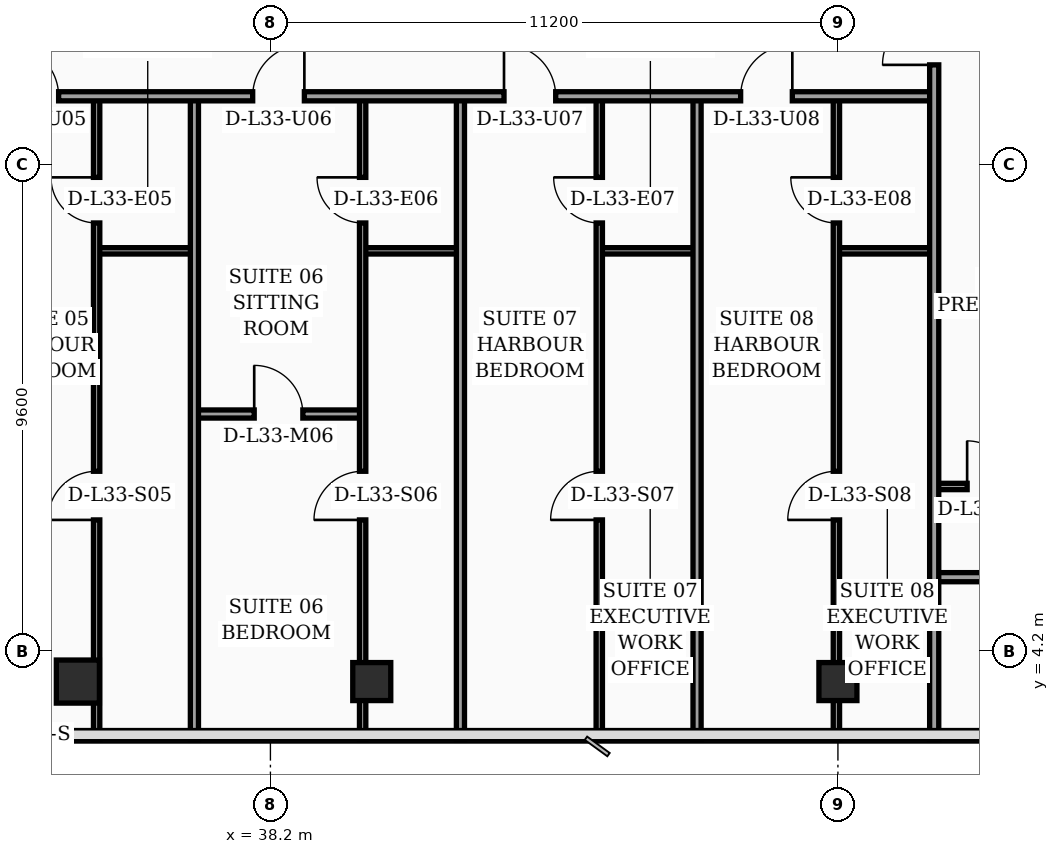
"""IFC4 building model, lengths in metres.
Left out: names, types, materials, properties, quantities, classifications, styles, units other than length and angle.
Written with IfcOpenShell. Run it as: python <this file> out.ifc"""

import sys

from ifc_helpers import new_model, si_unit, direction, frame, frame_2d, origin, origin_2d, place, context, subcontext, project, spatial, rectangle, hollow_rectangle, extrude, element, fill, save


model = new_model("IFC4")
c1 = context("Model", 3, precision=1e-05, world=origin(), true_north=direction((0.0, 1.0)))
c2 = subcontext(c1, "Body", "Model", "MODEL_VIEW")
j1 = project(units=[si_unit("LENGTHUNIT", "METRE"), si_unit("PLANEANGLEUNIT", "RADIAN")], contexts=[c1])
p1 = place(None, origin())
s1 = spatial("IfcSite", under=j1, at=p1, CompositionType="ELEMENT")
p2 = place(p1, origin())
s2 = spatial("IfcBuilding", under=s1, at=p2, CompositionType="ELEMENT")
p3 = place(p2, frame((0.0, 0.0, 135.4)))
s3 = spatial("IfcBuildingStorey", under=s2, at=p3, CompositionType="ELEMENT", Elevation=135.4)
p4 = place(p3, frame((34.4, 3.6, 0.0), z_axis=(0.0, 0.0, 1.0), x_axis=(1.0, 0.0, 0.0)))
e1 = element("IfcColumn", 1, at=p4, inside=s3, PredefinedType="COLUMN", context=c2, shape_type="SweptSolid", body=[
    extrude(hollow_rectangle(XDim=0.85, YDim=0.85, WallThickness=0.036, at=origin_2d()), origin(), (0.0, 0.0, 1.0), 3.52),
])
for number, where, z_axis, x_axis in (
    (2, (40.2, 3.6, 0.0), (0.0, 0.0, 1.0), (1.0, 0.0, 0.0)),
    (3, (49.4, 3.6, 0.0), (0.0, 0.0, 1.0), (1.0, 0.0, 0.0)),
):
    element("IfcColumn", number, at=place(p3, frame(where, z_axis=z_axis, x_axis=x_axis)), inside=s3, PredefinedType="COLUMN", context=c2, shape_type="SweptSolid", body=[
        extrude(hollow_rectangle(XDim=0.75, YDim=0.75, WallThickness=0.032, at=origin_2d()), origin(), (0.0, 0.0, 1.0), 3.52),
    ])
p5 = place(p3, frame((59.23, 5.505, 0.0), z_axis=(0.0, 0.0, 1.0), x_axis=(-0.300509063924, 0.953778958931, 0.0)))
e4 = element("IfcWall", 4, at=p5, inside=s3, PredefinedType="SOLIDWALL", context=c2, shape_type="SweptSolid", body=[
    extrude(rectangle(XDim=30.814, YDim=0.32, at=frame_2d((15.407, 0.0))), origin(), (0.0, 0.0, 1.0), 3.52),
])
p6 = place(p5, frame((18.796, 0.0, 0.0)))
e5 = element("IfcOpeningElement", 5, at=p6, cuts=e4, PredefinedType="OPENING", context=c2, shape_type="SweptSolid", body=[
    extrude(rectangle(XDim=1.4, YDim=2.25, at=frame_2d((0.7, 1.125))), frame((0.0, 0.17, 0.0), z_axis=(0.0, -1.0, 0.0), x_axis=(1.0, 0.0, 0.0)), (0.0, 0.0, 1.0), 0.34),
])
p7 = place(p5, frame((2.65, 0.0, 0.75)))
e6 = element("IfcOpeningElement", 6, at=p7, cuts=e4, PredefinedType="OPENING", context=c2, shape_type="SweptSolid", body=[
    extrude(rectangle(XDim=1.5, YDim=1.6, at=frame_2d((0.75, 0.8))), frame((0.0, 0.17, 0.0), z_axis=(0.0, -1.0, 0.0), x_axis=(1.0, 0.0, 0.0)), (0.0, 0.0, 1.0), 0.34),
])
p8 = place(p5, frame((4.7, 0.0, 0.75)))
e7 = element("IfcOpeningElement", 7, at=p8, cuts=e4, PredefinedType="OPENING", context=c2, shape_type="SweptSolid", body=[
    extrude(rectangle(XDim=1.5, YDim=1.6, at=frame_2d((0.75, 0.8))), frame((0.0, 0.17, 0.0), z_axis=(0.0, -1.0, 0.0), x_axis=(1.0, 0.0, 0.0)), (0.0, 0.0, 1.0), 0.34),
])
p9 = place(p5, frame((7.8, 0.0, 0.75)))
e8 = element("IfcOpeningElement", 8, at=p9, cuts=e4, PredefinedType="OPENING", context=c2, shape_type="SweptSolid", body=[
    extrude(rectangle(XDim=1.5, YDim=1.6, at=frame_2d((0.75, 0.8))), frame((0.0, 0.17, 0.0), z_axis=(0.0, -1.0, 0.0), x_axis=(1.0, 0.0, 0.0)), (0.0, 0.0, 1.0), 0.34),
])
p10 = place(p5, frame((10.9, 0.0, 0.75)))
e9 = element("IfcOpeningElement", 9, at=p10, cuts=e4, PredefinedType="OPENING", context=c2, shape_type="SweptSolid", body=[
    extrude(rectangle(XDim=1.5, YDim=1.6, at=frame_2d((0.75, 0.8))), frame((0.0, 0.17, 0.0), z_axis=(0.0, -1.0, 0.0), x_axis=(1.0, 0.0, 0.0)), (0.0, 0.0, 1.0), 0.34),
])
p11 = place(p5, frame((14.0, 0.0, 0.75)))
e10 = element("IfcOpeningElement", 10, at=p11, cuts=e4, PredefinedType="OPENING", context=c2, shape_type="SweptSolid", body=[
    extrude(rectangle(XDim=1.5, YDim=1.6, at=frame_2d((0.75, 0.8))), frame((0.0, 0.17, 0.0), z_axis=(0.0, -1.0, 0.0), x_axis=(1.0, 0.0, 0.0)), (0.0, 0.0, 1.0), 0.34),
])
p12 = place(p5, frame((16.55, 0.0, 0.75)))
e11 = element("IfcOpeningElement", 11, at=p12, cuts=e4, PredefinedType="OPENING", context=c2, shape_type="SweptSolid", body=[
    extrude(rectangle(XDim=1.5, YDim=1.6, at=frame_2d((0.75, 0.8))), frame((0.0, 0.17, 0.0), z_axis=(0.0, -1.0, 0.0), x_axis=(1.0, 0.0, 0.0)), (0.0, 0.0, 1.0), 0.34),
])
p13 = place(p5, frame((20.75, 0.0, 0.75)))
e12 = element("IfcOpeningElement", 12, at=p13, cuts=e4, PredefinedType="OPENING", context=c2, shape_type="SweptSolid", body=[
    extrude(rectangle(XDim=1.5, YDim=1.6, at=frame_2d((0.75, 0.8))), frame((0.0, 0.17, 0.0), z_axis=(0.0, -1.0, 0.0), x_axis=(1.0, 0.0, 0.0)), (0.0, 0.0, 1.0), 0.34),
])
p14 = place(p5, frame((23.3, 0.0, 0.75)))
e13 = element("IfcOpeningElement", 13, at=p14, cuts=e4, PredefinedType="OPENING", context=c2, shape_type="SweptSolid", body=[
    extrude(rectangle(XDim=1.5, YDim=1.6, at=frame_2d((0.75, 0.8))), frame((0.0, 0.17, 0.0), z_axis=(0.0, -1.0, 0.0), x_axis=(1.0, 0.0, 0.0)), (0.0, 0.0, 1.0), 0.34),
])
p15 = place(p5, frame((26.4, 0.0, 0.75)))
e14 = element("IfcOpeningElement", 14, at=p15, cuts=e4, PredefinedType="OPENING", context=c2, shape_type="SweptSolid", body=[
    extrude(rectangle(XDim=1.5, YDim=1.6, at=frame_2d((0.75, 0.8))), frame((0.0, 0.17, 0.0), z_axis=(0.0, -1.0, 0.0), x_axis=(1.0, 0.0, 0.0)), (0.0, 0.0, 1.0), 0.34),
])
p16 = place(p3, frame((34.77, 12.1, 0.0), z_axis=(0.0, 0.0, 1.0), x_axis=(1.0, 0.0, 0.0)))
e15 = element("IfcWall", 15, at=p16, inside=s3, PredefinedType="PARTITIONING", context=c2, shape_type="SweptSolid", body=[
    extrude(rectangle(XDim=1.93, YDim=0.125, at=frame_2d((0.965, 0.0))), origin(), (0.0, 0.0, 1.0), 2.82),
])
p17 = place(p3, frame((34.77, 2.44, 0.0), z_axis=(0.0, 0.0, 1.0), x_axis=(0.0, 1.0, 0.0)))
e16 = element("IfcWall", 16, at=p17, inside=s3, PredefinedType="PARTITIONING", context=c2, shape_type="SweptSolid", body=[
    extrude(rectangle(XDim=12.71, YDim=0.125, at=frame_2d((6.355, 0.0))), origin(), (0.0, 0.0, 1.0), 2.82),
])
p18 = place(p17, frame((4.35, 0.0, 0.0)))
e17 = element("IfcOpeningElement", 17, at=p18, cuts=e16, PredefinedType="OPENING", context=c2, shape_type="SweptSolid", body=[
    extrude(rectangle(XDim=0.96, YDim=2.2, at=frame_2d((0.48, 1.1))), frame((0.0, 0.073, 0.0), z_axis=(0.0, -1.0, 0.0), x_axis=(1.0, 0.0, 0.0)), (0.0, 0.0, 1.0), 0.145),
])
p19 = place(p17, frame((10.21, 0.0, 0.0)))
e18 = element("IfcOpeningElement", 18, at=p19, cuts=e16, PredefinedType="OPENING", context=c2, shape_type="SweptSolid", body=[
    extrude(rectangle(XDim=0.9, YDim=2.15, at=frame_2d((0.45, 1.075))), frame((0.0, 0.073, 0.0), z_axis=(0.0, -1.0, 0.0), x_axis=(1.0, 0.0, 0.0)), (0.0, 0.0, 1.0), 0.145),
])
p20 = place(p3, frame((40.02, 12.1, 0.0), z_axis=(0.0, 0.0, 1.0), x_axis=(1.0, 0.0, 0.0)))
e19 = element("IfcWall", 19, at=p20, inside=s3, PredefinedType="PARTITIONING", context=c2, shape_type="SweptSolid", body=[
    extrude(rectangle(XDim=1.93, YDim=0.125, at=frame_2d((0.965, 0.0))), origin(), (0.0, 0.0, 1.0), 3.52),
])
p21 = place(p3, frame((36.7, 8.88, 0.0), z_axis=(0.0, 0.0, 1.0), x_axis=(1.0, 0.0, 0.0)))
e20 = element("IfcWall", 20, at=p21, inside=s3, PredefinedType="PARTITIONING", context=c2, shape_type="SweptSolid", body=[
    extrude(rectangle(XDim=3.32, YDim=0.16, at=frame_2d((1.66, 0.0))), origin(), (0.0, 0.0, 1.0), 2.82),
])
p22 = place(p21, frame((1.18, 0.0, 0.0)))
e21 = element("IfcOpeningElement", 21, at=p22, cuts=e20, PredefinedType="OPENING", context=c2, shape_type="SweptSolid", body=[
    extrude(rectangle(XDim=0.96, YDim=2.2, at=frame_2d((0.48, 1.1))), frame((0.0, 0.09, 0.0), z_axis=(0.0, -1.0, 0.0), x_axis=(1.0, 0.0, 0.0)), (0.0, 0.0, 1.0), 0.18),
])
p23 = place(p3, frame((40.02, 2.44, 0.0), z_axis=(0.0, 0.0, 1.0), x_axis=(0.0, 1.0, 0.0)))
e22 = element("IfcWall", 22, at=p23, inside=s3, PredefinedType="PARTITIONING", context=c2, shape_type="SweptSolid", body=[
    extrude(rectangle(XDim=12.71, YDim=0.125, at=frame_2d((6.355, 0.0))), origin(), (0.0, 0.0, 1.0), 2.82),
])
p24 = place(p23, frame((4.35, 0.0, 0.0)))
e23 = element("IfcOpeningElement", 23, at=p24, cuts=e22, PredefinedType="OPENING", context=c2, shape_type="SweptSolid", body=[
    extrude(rectangle(XDim=0.96, YDim=2.2, at=frame_2d((0.48, 1.1))), frame((0.0, 0.073, 0.0), z_axis=(0.0, -1.0, 0.0), x_axis=(1.0, 0.0, 0.0)), (0.0, 0.0, 1.0), 0.145),
])
p25 = place(p23, frame((10.21, 0.0, 0.0)))
e24 = element("IfcOpeningElement", 24, at=p25, cuts=e22, PredefinedType="OPENING", context=c2, shape_type="SweptSolid", body=[
    extrude(rectangle(XDim=0.9, YDim=2.15, at=frame_2d((0.45, 1.075))), frame((0.0, 0.073, 0.0), z_axis=(0.0, -1.0, 0.0), x_axis=(1.0, 0.0, 0.0)), (0.0, 0.0, 1.0), 0.145),
])
p26 = place(p3, frame((36.7, 2.44, 0.0), z_axis=(0.0, 0.0, 1.0), x_axis=(0.0, 1.0, 0.0)))
e25 = element("IfcWall", 25, at=p26, inside=s3, PredefinedType="PARTITIONING", context=c2, shape_type="SweptSolid", body=[
    extrude(rectangle(XDim=12.71, YDim=0.16, at=frame_2d((6.355, 0.0))), origin(), (0.0, 0.0, 1.0), 2.82),
])
p27 = place(p3, frame((44.69, 12.1, 0.0), z_axis=(0.0, 0.0, 1.0), x_axis=(1.0, 0.0, 0.0)))
e26 = element("IfcWall", 26, at=p27, inside=s3, PredefinedType="PARTITIONING", context=c2, shape_type="SweptSolid", body=[
    extrude(rectangle(XDim=1.93, YDim=0.125, at=frame_2d((0.965, 0.0))), origin(), (0.0, 0.0, 1.0), 3.52),
])
p28 = place(p3, frame((44.69, 2.44, 0.0), z_axis=(0.0, 0.0, 1.0), x_axis=(0.0, 1.0, 0.0)))
e27 = element("IfcWall", 27, at=p28, inside=s3, PredefinedType="PARTITIONING", context=c2, shape_type="SweptSolid", body=[
    extrude(rectangle(XDim=12.71, YDim=0.125, at=frame_2d((6.355, 0.0))), origin(), (0.0, 0.0, 1.0), 3.02),
])
p29 = place(p28, frame((4.35, 0.0, 0.0)))
e28 = element("IfcOpeningElement", 28, at=p29, cuts=e27, PredefinedType="OPENING", context=c2, shape_type="SweptSolid", body=[
    extrude(rectangle(XDim=0.96, YDim=2.2, at=frame_2d((0.48, 1.1))), frame((0.0, 0.073, 0.0), z_axis=(0.0, -1.0, 0.0), x_axis=(1.0, 0.0, 0.0)), (0.0, 0.0, 1.0), 0.145),
])
p30 = place(p28, frame((10.21, 0.0, 0.0)))
e29 = element("IfcOpeningElement", 29, at=p30, cuts=e27, PredefinedType="OPENING", context=c2, shape_type="SweptSolid", body=[
    extrude(rectangle(XDim=0.9, YDim=2.15, at=frame_2d((0.45, 1.075))), frame((0.0, 0.073, 0.0), z_axis=(0.0, -1.0, 0.0), x_axis=(1.0, 0.0, 0.0)), (0.0, 0.0, 1.0), 0.145),
])
p31 = place(p3, frame((41.95, 2.44, 0.0), z_axis=(0.0, 0.0, 1.0), x_axis=(0.0, 1.0, 0.0)))
e30 = element("IfcWall", 30, at=p31, inside=s3, PredefinedType="PARTITIONING", context=c2, shape_type="SweptSolid", body=[
    extrude(rectangle(XDim=12.71, YDim=0.16, at=frame_2d((6.355, 0.0))), origin(), (0.0, 0.0, 1.0), 3.02),
])
p32 = place(p3, frame((49.37, 12.1, 0.0), z_axis=(0.0, 0.0, 1.0), x_axis=(1.0, 0.0, 0.0)))
e31 = element("IfcWall", 31, at=p32, inside=s3, PredefinedType="PARTITIONING", context=c2, shape_type="SweptSolid", body=[
    extrude(rectangle(XDim=1.93, YDim=0.125, at=frame_2d((0.965, 0.0))), origin(), (0.0, 0.0, 1.0), 3.52),
])
p33 = place(p3, frame((49.37, 2.44, 0.0), z_axis=(0.0, 0.0, 1.0), x_axis=(0.0, 1.0, 0.0)))
e32 = element("IfcWall", 32, at=p33, inside=s3, PredefinedType="PARTITIONING", context=c2, shape_type="SweptSolid", body=[
    extrude(rectangle(XDim=12.71, YDim=0.125, at=frame_2d((6.355, 0.0))), origin(), (0.0, 0.0, 1.0), 2.82),
])
p34 = place(p33, frame((4.35, 0.0, 0.0)))
e33 = element("IfcOpeningElement", 33, at=p34, cuts=e32, PredefinedType="OPENING", context=c2, shape_type="SweptSolid", body=[
    extrude(rectangle(XDim=0.96, YDim=2.2, at=frame_2d((0.48, 1.1))), frame((0.0, 0.073, 0.0), z_axis=(0.0, -1.0, 0.0), x_axis=(1.0, 0.0, 0.0)), (0.0, 0.0, 1.0), 0.145),
])
p35 = place(p33, frame((10.21, 0.0, 0.0)))
e34 = element("IfcOpeningElement", 34, at=p35, cuts=e32, PredefinedType="OPENING", context=c2, shape_type="SweptSolid", body=[
    extrude(rectangle(XDim=0.9, YDim=2.15, at=frame_2d((0.45, 1.075))), frame((0.0, 0.073, 0.0), z_axis=(0.0, -1.0, 0.0), x_axis=(1.0, 0.0, 0.0)), (0.0, 0.0, 1.0), 0.145),
])
p36 = place(p3, frame((46.62, 2.44, 0.0), z_axis=(0.0, 0.0, 1.0), x_axis=(0.0, 1.0, 0.0)))
e35 = element("IfcWall", 35, at=p36, inside=s3, PredefinedType="PARTITIONING", context=c2, shape_type="SweptSolid", body=[
    extrude(rectangle(XDim=12.71, YDim=0.16, at=frame_2d((6.355, 0.0))), origin(), (0.0, 0.0, 1.0), 2.82),
])
p37 = place(p3, frame((32.4, 15.15, 0.0), z_axis=(0.0, 0.0, 1.0), x_axis=(1.0, 0.0, 0.0)))
e36 = element("IfcWall", 36, at=p37, inside=s3, PredefinedType="PARTITIONING", context=c2, shape_type="SweptSolid", body=[
    extrude(rectangle(XDim=18.9, YDim=0.18, at=frame_2d((9.45, 0.0))), origin(), (0.0, 0.0, 1.0), 2.82),
])
p38 = place(p37, frame((0.6, 0.0, 0.0)))
e37 = element("IfcOpeningElement", 37, at=p38, cuts=e36, PredefinedType="OPENING", context=c2, shape_type="SweptSolid", body=[
    extrude(rectangle(XDim=1.02, YDim=2.2, at=frame_2d((0.51, 1.1))), frame((0.0, 0.1, 0.0), z_axis=(0.0, -1.0, 0.0), x_axis=(1.0, 0.0, 0.0)), (0.0, 0.0, 1.0), 0.2),
])
p39 = place(p37, frame((5.45, 0.0, 0.0)))
e38 = element("IfcOpeningElement", 38, at=p39, cuts=e36, PredefinedType="OPENING", context=c2, shape_type="SweptSolid", body=[
    extrude(rectangle(XDim=1.02, YDim=2.2, at=frame_2d((0.51, 1.1))), frame((0.0, 0.1, 0.0), z_axis=(0.0, -1.0, 0.0), x_axis=(1.0, 0.0, 0.0)), (0.0, 0.0, 1.0), 0.2),
])
p40 = place(p37, frame((10.41, 0.0, 0.0)))
e39 = element("IfcOpeningElement", 39, at=p40, cuts=e36, PredefinedType="OPENING", context=c2, shape_type="SweptSolid", body=[
    extrude(rectangle(XDim=1.02, YDim=2.2, at=frame_2d((0.51, 1.1))), frame((0.0, 0.1, 0.0), z_axis=(0.0, -1.0, 0.0), x_axis=(1.0, 0.0, 0.0)), (0.0, 0.0, 1.0), 0.2),
])
p41 = place(p37, frame((15.08, 0.0, 0.0)))
e40 = element("IfcOpeningElement", 40, at=p41, cuts=e36, PredefinedType="OPENING", context=c2, shape_type="SweptSolid", body=[
    extrude(rectangle(XDim=1.02, YDim=2.2, at=frame_2d((0.51, 1.1))), frame((0.0, 0.1, 0.0), z_axis=(0.0, -1.0, 0.0), x_axis=(1.0, 0.0, 0.0)), (0.0, 0.0, 1.0), 0.2),
])
p42 = place(p3, frame((51.3, 7.45, 0.0), z_axis=(0.0, 0.0, 1.0), x_axis=(1.0, 0.0, 0.0)))
e41 = element("IfcWall", 41, at=p42, inside=s3, PredefinedType="PARTITIONING", context=c2, shape_type="SweptSolid", body=[
    extrude(rectangle(XDim=7.26, YDim=0.125, at=frame_2d((3.63, 0.0))), origin(), (0.0, 0.0, 1.0), 3.02),
])
p43 = place(p42, frame((0.65, 0.0, 0.0)))
e42 = element("IfcOpeningElement", 42, at=p43, cuts=e41, PredefinedType="OPENING", context=c2, shape_type="SweptSolid", body=[
    extrude(rectangle(XDim=0.9, YDim=2.15, at=frame_2d((0.45, 1.075))), frame((0.0, 0.073, 0.0), z_axis=(0.0, -1.0, 0.0), x_axis=(1.0, 0.0, 0.0)), (0.0, 0.0, 1.0), 0.145),
])
p44 = place(p3, frame((51.3, 5.66, 0.0), z_axis=(0.0, 0.0, 1.0), x_axis=(1.0, 0.0, 0.0)))
e43 = element("IfcWall", 43, at=p44, inside=s3, PredefinedType="PARTITIONING", context=c2, shape_type="SweptSolid", body=[
    extrude(rectangle(XDim=4.7, YDim=0.18, at=frame_2d((2.35, 0.0))), origin(), (0.0, 0.0, 1.0), 3.02),
])
p45 = place(p3, frame((51.3, 2.44, 0.0), z_axis=(0.0, 0.0, 1.0), x_axis=(0.0, 1.0, 0.0)))
e44 = element("IfcWall", 44, at=p45, inside=s3, PredefinedType="PARTITIONING", context=c2, shape_type="SweptSolid", body=[
    extrude(rectangle(XDim=15.56, YDim=0.18, at=frame_2d((7.78, 0.0))), origin(), (0.0, 0.0, 1.0), 3.02),
])
p46 = place(p45, frame((13.33, 0.0, 0.0)))
e45 = element("IfcOpeningElement", 45, at=p46, cuts=e44, PredefinedType="OPENING", context=c2, shape_type="SweptSolid", body=[
    extrude(rectangle(XDim=1.02, YDim=2.2, at=frame_2d((0.51, 1.1))), frame((0.0, 0.1, 0.0), z_axis=(0.0, -1.0, 0.0), x_axis=(1.0, 0.0, 0.0)), (0.0, 0.0, 1.0), 0.2),
])
p47 = place(p18, origin())
e46 = element("IfcDoor", 46, at=p47, inside=s3, OperationType="SINGLE_SWING_LEFT", PredefinedType="DOOR", context=c2, shape_type="SweptSolid", body=[
    extrude(rectangle(XDim=0.96, YDim=2.2, at=frame_2d((0.48, 1.1))), frame((0.0, 0.025, 0.0), z_axis=(0.0, -1.0, 0.0), x_axis=(1.0, 0.0, 0.0)), (0.0, 0.0, 1.0), 0.05),
])
fill(e17, e46)
p48 = place(p19, origin())
e47 = element("IfcDoor", 47, at=p48, inside=s3, OperationType="SINGLE_SWING_RIGHT", PredefinedType="DOOR", context=c2, shape_type="SweptSolid", body=[
    extrude(rectangle(XDim=0.9, YDim=2.15, at=frame_2d((0.45, 1.075))), frame((0.0, 0.025, 0.0), z_axis=(0.0, -1.0, 0.0), x_axis=(1.0, 0.0, 0.0)), (0.0, 0.0, 1.0), 0.05),
])
fill(e18, e47)
p49 = place(p22, origin())
e48 = element("IfcDoor", 48, at=p49, inside=s3, OperationType="SINGLE_SWING_LEFT", PredefinedType="DOOR", context=c2, shape_type="SweptSolid", body=[
    extrude(rectangle(XDim=0.96, YDim=2.2, at=frame_2d((0.48, 1.1))), frame((0.0, 0.025, 0.0), z_axis=(0.0, -1.0, 0.0), x_axis=(1.0, 0.0, 0.0)), (0.0, 0.0, 1.0), 0.05),
])
fill(e21, e48)
p50 = place(p24, origin())
e49 = element("IfcDoor", 49, at=p50, inside=s3, OperationType="SINGLE_SWING_LEFT", PredefinedType="DOOR", context=c2, shape_type="SweptSolid", body=[
    extrude(rectangle(XDim=0.96, YDim=2.2, at=frame_2d((0.48, 1.1))), frame((0.0, 0.025, 0.0), z_axis=(0.0, -1.0, 0.0), x_axis=(1.0, 0.0, 0.0)), (0.0, 0.0, 1.0), 0.05),
])
fill(e23, e49)
p51 = place(p25, origin())
e50 = element("IfcDoor", 50, at=p51, inside=s3, OperationType="SINGLE_SWING_RIGHT", PredefinedType="DOOR", context=c2, shape_type="SweptSolid", body=[
    extrude(rectangle(XDim=0.9, YDim=2.15, at=frame_2d((0.45, 1.075))), frame((0.0, 0.025, 0.0), z_axis=(0.0, -1.0, 0.0), x_axis=(1.0, 0.0, 0.0)), (0.0, 0.0, 1.0), 0.05),
])
fill(e24, e50)
p52 = place(p29, origin())
e51 = element("IfcDoor", 51, at=p52, inside=s3, OperationType="SINGLE_SWING_LEFT", PredefinedType="DOOR", context=c2, shape_type="SweptSolid", body=[
    extrude(rectangle(XDim=0.96, YDim=2.2, at=frame_2d((0.48, 1.1))), frame((0.0, 0.025, 0.0), z_axis=(0.0, -1.0, 0.0), x_axis=(1.0, 0.0, 0.0)), (0.0, 0.0, 1.0), 0.05),
])
fill(e28, e51)
p53 = place(p30, origin())
e52 = element("IfcDoor", 52, at=p53, inside=s3, OperationType="SINGLE_SWING_RIGHT", PredefinedType="DOOR", context=c2, shape_type="SweptSolid", body=[
    extrude(rectangle(XDim=0.9, YDim=2.15, at=frame_2d((0.45, 1.075))), frame((0.0, 0.025, 0.0), z_axis=(0.0, -1.0, 0.0), x_axis=(1.0, 0.0, 0.0)), (0.0, 0.0, 1.0), 0.05),
])
fill(e29, e52)
p54 = place(p34, origin())
e53 = element("IfcDoor", 53, at=p54, inside=s3, OperationType="SINGLE_SWING_LEFT", PredefinedType="DOOR", context=c2, shape_type="SweptSolid", body=[
    extrude(rectangle(XDim=0.96, YDim=2.2, at=frame_2d((0.48, 1.1))), frame((0.0, 0.025, 0.0), z_axis=(0.0, -1.0, 0.0), x_axis=(1.0, 0.0, 0.0)), (0.0, 0.0, 1.0), 0.05),
])
fill(e33, e53)
p55 = place(p35, origin())
e54 = element("IfcDoor", 54, at=p55, inside=s3, OperationType="SINGLE_SWING_RIGHT", PredefinedType="DOOR", context=c2, shape_type="SweptSolid", body=[
    extrude(rectangle(XDim=0.9, YDim=2.15, at=frame_2d((0.45, 1.075))), frame((0.0, 0.025, 0.0), z_axis=(0.0, -1.0, 0.0), x_axis=(1.0, 0.0, 0.0)), (0.0, 0.0, 1.0), 0.05),
])
fill(e34, e54)
p56 = place(p38, origin())
e55 = element("IfcDoor", 55, at=p56, inside=s3, OperationType="SINGLE_SWING_LEFT", PredefinedType="DOOR", context=c2, shape_type="SweptSolid", body=[
    extrude(rectangle(XDim=1.02, YDim=2.2, at=frame_2d((0.51, 1.1))), frame((0.0, 0.025, 0.0), z_axis=(0.0, -1.0, 0.0), x_axis=(1.0, 0.0, 0.0)), (0.0, 0.0, 1.0), 0.05),
])
fill(e37, e55)
p57 = place(p39, origin())
e56 = element("IfcDoor", 56, at=p57, inside=s3, OperationType="SINGLE_SWING_RIGHT", PredefinedType="DOOR", context=c2, shape_type="SweptSolid", body=[
    extrude(rectangle(XDim=1.02, YDim=2.2, at=frame_2d((0.51, 1.1))), frame((0.0, 0.025, 0.0), z_axis=(0.0, -1.0, 0.0), x_axis=(1.0, 0.0, 0.0)), (0.0, 0.0, 1.0), 0.05),
])
fill(e38, e56)
p58 = place(p40, origin())
e57 = element("IfcDoor", 57, at=p58, inside=s3, OperationType="SINGLE_SWING_LEFT", PredefinedType="DOOR", context=c2, shape_type="SweptSolid", body=[
    extrude(rectangle(XDim=1.02, YDim=2.2, at=frame_2d((0.51, 1.1))), frame((0.0, 0.025, 0.0), z_axis=(0.0, -1.0, 0.0), x_axis=(1.0, 0.0, 0.0)), (0.0, 0.0, 1.0), 0.05),
])
fill(e39, e57)
p59 = place(p41, origin())
e58 = element("IfcDoor", 58, at=p59, inside=s3, OperationType="SINGLE_SWING_RIGHT", PredefinedType="DOOR", context=c2, shape_type="SweptSolid", body=[
    extrude(rectangle(XDim=1.02, YDim=2.2, at=frame_2d((0.51, 1.1))), frame((0.0, 0.025, 0.0), z_axis=(0.0, -1.0, 0.0), x_axis=(1.0, 0.0, 0.0)), (0.0, 0.0, 1.0), 0.05),
])
fill(e40, e58)
p60 = place(p43, origin())
e59 = element("IfcDoor", 59, at=p60, inside=s3, OperationType="SINGLE_SWING_LEFT", PredefinedType="DOOR", context=c2, shape_type="SweptSolid", body=[
    extrude(rectangle(XDim=0.9, YDim=2.15, at=frame_2d((0.45, 1.075))), frame((0.0, 0.025, 0.0), z_axis=(0.0, -1.0, 0.0), x_axis=(1.0, 0.0, 0.0)), (0.0, 0.0, 1.0), 0.05),
])
fill(e42, e59)
p61 = place(p46, origin())
e60 = element("IfcDoor", 60, at=p61, inside=s3, OperationType="SINGLE_SWING_LEFT", PredefinedType="DOOR", context=c2, shape_type="SweptSolid", body=[
    extrude(rectangle(XDim=1.02, YDim=2.2, at=frame_2d((0.51, 1.1))), frame((0.0, 0.025, 0.0), z_axis=(0.0, -1.0, 0.0), x_axis=(1.0, 0.0, 0.0)), (0.0, 0.0, 1.0), 0.05),
])
fill(e45, e60)
save(model, sys.argv[1])
